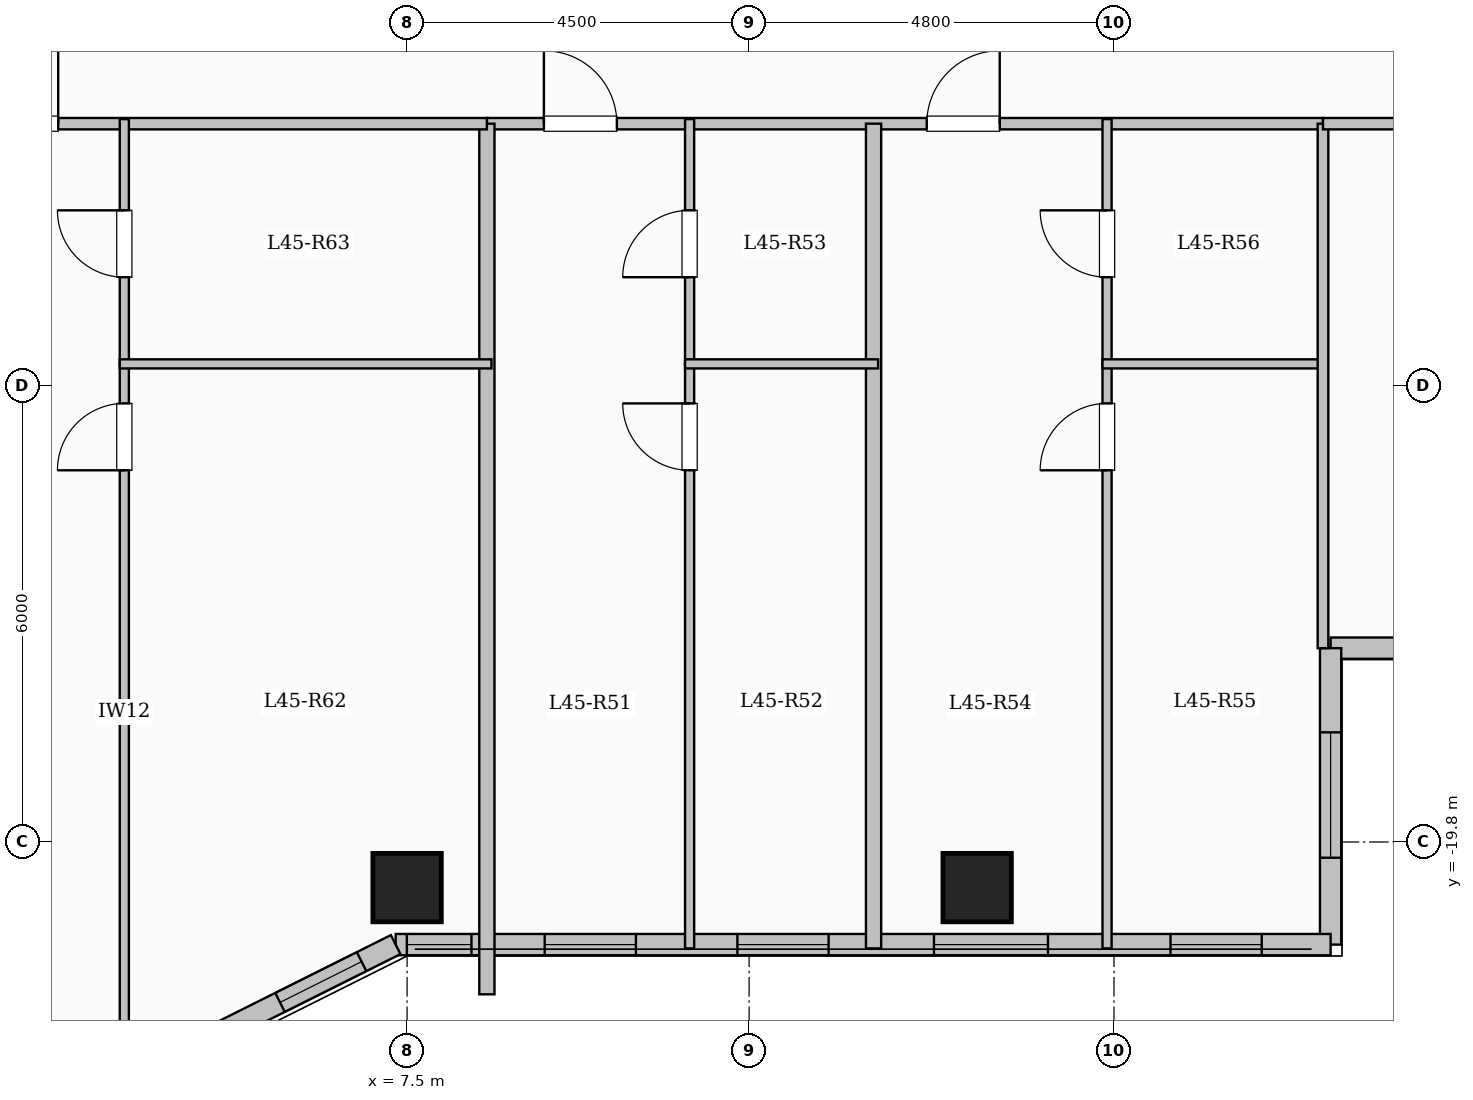
"""IFC4 building model, lengths in metres.
Left out: names, types, materials, properties, quantities, classifications, styles, units other than length and angle.
Written with IfcOpenShell. Run it as: python <this file> out.ifc"""

import sys

from ifc_helpers import new_model, si_unit, direction, frame, frame_2d, origin, origin_2d, place, context, subcontext, project, spatial, rectangle, extrude, element, fill, save


model = new_model("IFC4")
c1 = context("Model", 3, precision=1e-05, world=origin(), true_north=direction((0.0, 1.0)))
c2 = subcontext(c1, "Body", "Model", "MODEL_VIEW")
j1 = project(units=[si_unit("LENGTHUNIT", "METRE"), si_unit("PLANEANGLEUNIT", "RADIAN")], contexts=[c1])
p1 = place(None, origin())
s1 = spatial("IfcSite", under=j1, at=p1, CompositionType="ELEMENT")
p2 = place(p1, origin())
s2 = spatial("IfcBuilding", under=s1, at=p2, CompositionType="ELEMENT")
p3 = place(p2, frame((0.0, 0.0, 166.1)))
s3 = spatial("IfcBuildingStorey", under=s2, at=p3, CompositionType="ELEMENT", Elevation=166.1)
for number, where, z_axis, x_axis in (
    (1, (7.5, -20.4, 0.0), (0.0, 0.0, 1.0), (1.0, 0.0, 0.0)),
    (2, (15.0, -20.4, 0.0), (0.0, 0.0, 1.0), (1.0, 0.0, 0.0)),
):
    element("IfcColumn", number, at=place(p3, frame(where, z_axis=z_axis, x_axis=x_axis)), inside=s3, PredefinedType="COLUMN", context=c2, shape_type="SweptSolid", body=[
        extrude(rectangle(XDim=0.9, YDim=0.9, at=origin_2d()), origin(), (0.0, 0.0, 1.0), 3.35),
    ])
p4 = place(p3, frame((25.05, -17.25, 0.0), z_axis=(0.0, 0.0, 1.0), x_axis=(-1.0, 0.0, 0.0)))
e3 = element("IfcWall", 3, at=p4, inside=s3, PredefinedType="SOLIDWALL", context=c2, shape_type="SweptSolid", body=[
    extrude(rectangle(XDim=5.4, YDim=0.28, at=frame_2d((2.7, 0.0))), origin(), (0.0, 0.0, 1.0), 3.1),
])
p5 = place(p4, frame((1.625, 0.0, 0.9)))
e4 = element("IfcOpeningElement", 4, at=p5, cuts=e3, PredefinedType="OPENING", context=c2, shape_type="SweptSolid", body=[
    extrude(rectangle(XDim=2.2, YDim=1.75, at=frame_2d((1.1, 0.875))), frame((0.0, 0.15, 0.0), z_axis=(0.0, -1.0, 0.0), x_axis=(1.0, 0.0, 0.0)), (0.0, 0.0, 1.0), 0.3),
])
p6 = place(p3, frame((19.65, -17.25, 0.0), z_axis=(0.0, 0.0, 1.0), x_axis=(0.0, -1.0, 0.0)))
e5 = element("IfcWall", 5, at=p6, inside=s3, PredefinedType="SOLIDWALL", context=c2, shape_type="SweptSolid", body=[
    extrude(rectangle(XDim=3.9, YDim=0.28, at=frame_2d((1.95, 0.0))), origin(), (0.0, 0.0, 1.0), 3.1),
])
p7 = place(p6, frame((1.107, 0.0, 0.9)))
e6 = element("IfcOpeningElement", 6, at=p7, cuts=e5, PredefinedType="OPENING", context=c2, shape_type="SweptSolid", body=[
    extrude(rectangle(XDim=1.65, YDim=1.6, at=frame_2d((0.825, 0.8))), frame((0.0, 0.15, 0.0), z_axis=(0.0, -1.0, 0.0), x_axis=(1.0, 0.0, 0.0)), (0.0, 0.0, 1.0), 0.3),
])
p8 = place(p3, frame((19.65, -21.15, 0.0), z_axis=(0.0, 0.0, 1.0), x_axis=(-1.0, 0.0, 0.0)))
e7 = element("IfcWall", 7, at=p8, inside=s3, PredefinedType="SOLIDWALL", context=c2, shape_type="SweptSolid", body=[
    extrude(rectangle(XDim=12.3, YDim=0.28, at=frame_2d((6.15, 0.0))), origin(), (0.0, 0.0, 1.0), 3.1),
])
p9 = place(p8, frame((0.906, 0.0, 0.95)))
e8 = element("IfcOpeningElement", 8, at=p9, cuts=e7, PredefinedType="OPENING", context=c2, shape_type="SweptSolid", body=[
    extrude(rectangle(XDim=1.2, YDim=1.5, at=frame_2d((0.6, 0.75))), frame((0.0, 0.15, 0.0), z_axis=(0.0, -1.0, 0.0), x_axis=(1.0, 0.0, 0.0)), (0.0, 0.0, 1.0), 0.3),
])
p10 = place(p8, frame((3.718, 0.0, 0.9)))
e9 = element("IfcOpeningElement", 9, at=p10, cuts=e7, PredefinedType="OPENING", context=c2, shape_type="SweptSolid", body=[
    extrude(rectangle(XDim=1.5, YDim=1.65, at=frame_2d((0.75, 0.825))), frame((0.0, 0.15, 0.0), z_axis=(0.0, -1.0, 0.0), x_axis=(1.0, 0.0, 0.0)), (0.0, 0.0, 1.0), 0.3),
])
p11 = place(p8, frame((6.604, 0.0, 0.95)))
e10 = element("IfcOpeningElement", 10, at=p11, cuts=e7, PredefinedType="OPENING", context=c2, shape_type="SweptSolid", body=[
    extrude(rectangle(XDim=1.2, YDim=1.5, at=frame_2d((0.6, 0.75))), frame((0.0, 0.15, 0.0), z_axis=(0.0, -1.0, 0.0), x_axis=(1.0, 0.0, 0.0)), (0.0, 0.0, 1.0), 0.3),
])
p12 = place(p8, frame((9.14, 0.0, 0.95)))
e11 = element("IfcOpeningElement", 11, at=p12, cuts=e7, PredefinedType="OPENING", context=c2, shape_type="SweptSolid", body=[
    extrude(rectangle(XDim=1.2, YDim=1.5, at=frame_2d((0.6, 0.75))), frame((0.0, 0.15, 0.0), z_axis=(0.0, -1.0, 0.0), x_axis=(1.0, 0.0, 0.0)), (0.0, 0.0, 1.0), 0.3),
])
p13 = place(p8, frame((11.303, 0.0, 0.95)))
e12 = element("IfcOpeningElement", 12, at=p13, cuts=e7, PredefinedType="OPENING", context=c2, shape_type="SweptSolid", body=[
    extrude(rectangle(XDim=0.85, YDim=1.5, at=frame_2d((0.425, 0.75))), frame((0.0, 0.15, 0.0), z_axis=(0.0, -1.0, 0.0), x_axis=(1.0, 0.0, 0.0)), (0.0, 0.0, 1.0), 0.3),
])
p14 = place(p3, frame((7.35, -21.15, 0.0), z_axis=(0.0, 0.0, 1.0), x_axis=(-0.894427191, -0.4472135955, 0.0)))
e13 = element("IfcWall", 13, at=p14, inside=s3, PredefinedType="SOLIDWALL", context=c2, shape_type="SweptSolid", body=[
    extrude(rectangle(XDim=3.354, YDim=0.28, at=frame_2d((1.677, 0.0))), origin(), (0.0, 0.0, 1.0), 3.1),
])
p15 = place(p14, frame((0.501, 0.0, 0.95)))
e14 = element("IfcOpeningElement", 14, at=p15, cuts=e13, PredefinedType="OPENING", context=c2, shape_type="SweptSolid", body=[
    extrude(rectangle(XDim=1.2, YDim=1.5, at=frame_2d((0.6, 0.75))), frame((0.0, 0.15, 0.0), z_axis=(0.0, -1.0, 0.0), x_axis=(1.0, 0.0, 0.0)), (0.0, 0.0, 1.0), 0.3),
])
p16 = place(p3, frame((8.55, -10.35, 0.0), z_axis=(0.0, 0.0, 1.0), x_axis=(1.0, 0.0, 0.0)))
e15 = element("IfcWall", 15, at=p16, inside=s3, PredefinedType="PARTITIONING", context=c2, shape_type="SweptSolid", body=[
    extrude(rectangle(XDim=11.0, YDim=0.15, at=frame_2d((5.5, 0.0))), origin(), (0.0, 0.0, 1.0), 3.1),
])
p17 = place(p16, frame((0.75, 0.0, 0.0)))
e16 = element("IfcOpeningElement", 16, at=p17, cuts=e15, PredefinedType="OPENING", context=c2, shape_type="SweptSolid", body=[
    extrude(rectangle(XDim=0.96, YDim=2.15, at=frame_2d((0.48, 1.075))), frame((0.0, 0.085, 0.0), z_axis=(0.0, -1.0, 0.0), x_axis=(1.0, 0.0, 0.0)), (0.0, 0.0, 1.0), 0.17),
])
p18 = place(p16, frame((5.787, 0.0, 0.0)))
e17 = element("IfcOpeningElement", 17, at=p18, cuts=e15, PredefinedType="OPENING", context=c2, shape_type="SweptSolid", body=[
    extrude(rectangle(XDim=0.96, YDim=2.15, at=frame_2d((0.48, 1.075))), frame((0.0, 0.085, 0.0), z_axis=(0.0, -1.0, 0.0), x_axis=(1.0, 0.0, 0.0)), (0.0, 0.0, 1.0), 0.17),
])
p19 = place(p3, frame((13.637, -21.2, 0.0), z_axis=(0.0, 0.0, 1.0), x_axis=(0.0, 1.0, 0.0)))
e18 = element("IfcWall", 18, at=p19, inside=s3, PredefinedType="SOLIDWALL", context=c2, shape_type="SweptSolid", body=[
    extrude(rectangle(XDim=10.85, YDim=0.2, at=frame_2d((5.425, 0.0))), origin(), (0.0, 0.0, 1.0), 3.1),
])
p20 = place(p3, frame((11.217, -21.2, 0.0), z_axis=(0.0, 0.0, 1.0), x_axis=(0.0, 1.0, 0.0)))
e19 = element("IfcWall", 19, at=p20, inside=s3, PredefinedType="PARTITIONING", context=c2, shape_type="SweptSolid", body=[
    extrude(rectangle(XDim=7.69, YDim=0.12, at=frame_2d((3.845, 0.0))), origin(), (0.0, 0.0, 1.0), 3.1),
])
p21 = place(p20, frame((6.29, 0.0, 0.0)))
e20 = element("IfcOpeningElement", 20, at=p21, cuts=e19, PredefinedType="OPENING", context=c2, shape_type="SweptSolid", body=[
    extrude(rectangle(XDim=0.88, YDim=2.1, at=frame_2d((0.44, 1.05))), frame((0.0, 0.07, 0.0), z_axis=(0.0, -1.0, 0.0), x_axis=(1.0, 0.0, 0.0)), (0.0, 0.0, 1.0), 0.14),
])
p22 = place(p3, frame((11.217, -13.51, 0.0), z_axis=(0.0, 0.0, 1.0), x_axis=(0.0, 1.0, 0.0)))
e21 = element("IfcWall", 21, at=p22, inside=s3, PredefinedType="PARTITIONING", context=c2, shape_type="SweptSolid", body=[
    extrude(rectangle(XDim=3.22, YDim=0.12, at=frame_2d((1.61, 0.0))), origin(), (0.0, 0.0, 1.0), 3.1),
])
p23 = place(p22, frame((1.14, 0.0, 0.0)))
e22 = element("IfcOpeningElement", 22, at=p23, cuts=e21, PredefinedType="OPENING", context=c2, shape_type="SweptSolid", body=[
    extrude(rectangle(XDim=0.88, YDim=2.1, at=frame_2d((0.44, 1.05))), frame((0.0, 0.07, 0.0), z_axis=(0.0, -1.0, 0.0), x_axis=(1.0, 0.0, 0.0)), (0.0, 0.0, 1.0), 0.14),
])
p24 = place(p3, frame((11.157, -13.51, 0.0), z_axis=(0.0, 0.0, 1.0), x_axis=(1.0, 0.0, 0.0)))
e23 = element("IfcWall", 23, at=p24, inside=s3, PredefinedType="PARTITIONING", context=c2, shape_type="SweptSolid", body=[
    extrude(rectangle(XDim=2.54, YDim=0.12, at=frame_2d((1.27, 0.0))), origin(), (0.0, 0.0, 1.0), 3.1),
])
p25 = place(p3, frame((16.709, -21.2, 0.0), z_axis=(0.0, 0.0, 1.0), x_axis=(0.0, 1.0, 0.0)))
e24 = element("IfcWall", 24, at=p25, inside=s3, PredefinedType="PARTITIONING", context=c2, shape_type="SweptSolid", body=[
    extrude(rectangle(XDim=7.69, YDim=0.12, at=frame_2d((3.845, 0.0))), origin(), (0.0, 0.0, 1.0), 3.1),
])
p26 = place(p25, frame((6.29, 0.0, 0.0)))
e25 = element("IfcOpeningElement", 25, at=p26, cuts=e24, PredefinedType="OPENING", context=c2, shape_type="SweptSolid", body=[
    extrude(rectangle(XDim=0.88, YDim=2.1, at=frame_2d((0.44, 1.05))), frame((0.0, 0.07, 0.0), z_axis=(0.0, -1.0, 0.0), x_axis=(1.0, 0.0, 0.0)), (0.0, 0.0, 1.0), 0.14),
])
p27 = place(p3, frame((16.709, -13.51, 0.0), z_axis=(0.0, 0.0, 1.0), x_axis=(0.0, 1.0, 0.0)))
e26 = element("IfcWall", 26, at=p27, inside=s3, PredefinedType="PARTITIONING", context=c2, shape_type="SweptSolid", body=[
    extrude(rectangle(XDim=3.22, YDim=0.12, at=frame_2d((1.61, 0.0))), origin(), (0.0, 0.0, 1.0), 3.1),
])
p28 = place(p27, frame((1.14, 0.0, 0.0)))
e27 = element("IfcOpeningElement", 27, at=p28, cuts=e26, PredefinedType="OPENING", context=c2, shape_type="SweptSolid", body=[
    extrude(rectangle(XDim=0.88, YDim=2.1, at=frame_2d((0.44, 1.05))), frame((0.0, 0.07, 0.0), z_axis=(0.0, -1.0, 0.0), x_axis=(1.0, 0.0, 0.0)), (0.0, 0.0, 1.0), 0.14),
])
p29 = place(p3, frame((16.649, -13.51, 0.0), z_axis=(0.0, 0.0, 1.0), x_axis=(1.0, 0.0, 0.0)))
e28 = element("IfcWall", 28, at=p29, inside=s3, PredefinedType="PARTITIONING", context=c2, shape_type="SweptSolid", body=[
    extrude(rectangle(XDim=2.961, YDim=0.12, at=frame_2d((1.48, 0.0))), origin(), (0.0, 0.0, 1.0), 3.1),
])
p30 = place(p3, frame((8.55, -21.804, 0.0), z_axis=(0.0, 0.0, 1.0), x_axis=(0.0, 1.0, 0.0)))
e29 = element("IfcWall", 29, at=p30, inside=s3, PredefinedType="SOLIDWALL", context=c2, shape_type="SweptSolid", body=[
    extrude(rectangle(XDim=11.454, YDim=0.2, at=frame_2d((5.727, 0.0))), origin(), (0.0, 0.0, 1.0), 3.1),
])
p31 = place(p3, frame((-8.55, -10.35, 0.0), z_axis=(0.0, 0.0, 1.0), x_axis=(1.0, 0.0, 0.0)))
e30 = element("IfcWall", 30, at=p31, inside=s3, PredefinedType="PARTITIONING", context=c2, shape_type="SweptSolid", body=[
    extrude(rectangle(XDim=17.1, YDim=0.15, at=frame_2d((8.55, 0.0))), origin(), (0.0, 0.0, 1.0), 3.1),
])
p32 = place(p31, frame((1.15, 0.0, 0.0)))
e31 = element("IfcOpeningElement", 31, at=p32, cuts=e30, PredefinedType="OPENING", context=c2, shape_type="SweptSolid", body=[
    extrude(rectangle(XDim=0.96, YDim=2.15, at=frame_2d((0.48, 1.075))), frame((0.0, 0.085, 0.0), z_axis=(0.0, -1.0, 0.0), x_axis=(1.0, 0.0, 0.0)), (0.0, 0.0, 1.0), 0.17),
])
p33 = place(p31, frame((10.5, 0.0, 0.0)))
e32 = element("IfcOpeningElement", 32, at=p33, cuts=e30, PredefinedType="OPENING", context=c2, shape_type="SweptSolid", body=[
    extrude(rectangle(XDim=0.96, YDim=2.15, at=frame_2d((0.48, 1.075))), frame((0.0, 0.085, 0.0), z_axis=(0.0, -1.0, 0.0), x_axis=(1.0, 0.0, 0.0)), (0.0, 0.0, 1.0), 0.17),
])
p34 = place(p3, frame((3.78, -22.68, 0.0), z_axis=(0.0, 0.0, 1.0), x_axis=(0.0, 1.0, 0.0)))
e33 = element("IfcWall", 33, at=p34, inside=s3, PredefinedType="PARTITIONING", context=c2, shape_type="SweptSolid", body=[
    extrude(rectangle(XDim=9.17, YDim=0.12, at=frame_2d((4.585, 0.0))), origin(), (0.0, 0.0, 1.0), 3.1),
])
p35 = place(p34, frame((7.77, 0.0, 0.0)))
e34 = element("IfcOpeningElement", 34, at=p35, cuts=e33, PredefinedType="OPENING", context=c2, shape_type="SweptSolid", body=[
    extrude(rectangle(XDim=0.88, YDim=2.1, at=frame_2d((0.44, 1.05))), frame((0.0, 0.07, 0.0), z_axis=(0.0, -1.0, 0.0), x_axis=(1.0, 0.0, 0.0)), (0.0, 0.0, 1.0), 0.14),
])
p36 = place(p3, frame((3.78, -13.51, 0.0), z_axis=(0.0, 0.0, 1.0), x_axis=(0.0, 1.0, 0.0)))
e35 = element("IfcWall", 35, at=p36, inside=s3, PredefinedType="PARTITIONING", context=c2, shape_type="SweptSolid", body=[
    extrude(rectangle(XDim=3.22, YDim=0.12, at=frame_2d((1.61, 0.0))), origin(), (0.0, 0.0, 1.0), 3.1),
])
p37 = place(p36, frame((1.14, 0.0, 0.0)))
e36 = element("IfcOpeningElement", 36, at=p37, cuts=e35, PredefinedType="OPENING", context=c2, shape_type="SweptSolid", body=[
    extrude(rectangle(XDim=0.88, YDim=2.1, at=frame_2d((0.44, 1.05))), frame((0.0, 0.07, 0.0), z_axis=(0.0, -1.0, 0.0), x_axis=(1.0, 0.0, 0.0)), (0.0, 0.0, 1.0), 0.14),
])
p38 = place(p3, frame((3.72, -13.51, 0.0), z_axis=(0.0, 0.0, 1.0), x_axis=(1.0, 0.0, 0.0)))
e37 = element("IfcWall", 37, at=p38, inside=s3, PredefinedType="PARTITIONING", context=c2, shape_type="SweptSolid", body=[
    extrude(rectangle(XDim=4.89, YDim=0.12, at=frame_2d((2.445, 0.0))), origin(), (0.0, 0.0, 1.0), 3.1),
])
p39 = place(p3, frame((19.55, -17.25, 0.0), z_axis=(0.0, 0.0, 1.0), x_axis=(0.0, 1.0, 0.0)))
e38 = element("IfcWall", 38, at=p39, inside=s3, PredefinedType="PARTITIONING", context=c2, shape_type="SweptSolid", body=[
    extrude(rectangle(XDim=6.9, YDim=0.14, at=frame_2d((3.45, 0.0))), origin(), (0.0, 0.0, 1.0), 3.1),
])
p40 = place(p3, frame((19.55, -10.35, 0.0), z_axis=(0.0, 0.0, 1.0), x_axis=(1.0, 0.0, 0.0)))
e39 = element("IfcWall", 39, at=p40, inside=s3, PredefinedType="PARTITIONING", context=c2, shape_type="SweptSolid", body=[
    extrude(rectangle(XDim=5.53, YDim=0.15, at=frame_2d((2.765, 0.0))), origin(), (0.0, 0.0, 1.0), 3.1),
])
p41 = place(p40, frame((2.29, 0.0, 0.0)))
e40 = element("IfcOpeningElement", 40, at=p41, cuts=e39, PredefinedType="OPENING", context=c2, shape_type="SweptSolid", body=[
    extrude(rectangle(XDim=0.95, YDim=2.15, at=frame_2d((0.475, 1.075))), frame((0.0, 0.085, 0.0), z_axis=(0.0, -1.0, 0.0), x_axis=(1.0, 0.0, 0.0)), (0.0, 0.0, 1.0), 0.17),
])
p42 = place(p7, origin())
e41 = element("IfcWindow", 41, at=p42, inside=s3, PartitioningType="SINGLE_PANEL", PredefinedType="WINDOW", context=c2, shape_type="SweptSolid", body=[
    extrude(rectangle(XDim=1.65, YDim=1.6, at=frame_2d((0.825, 0.8))), frame((0.0, 0.03, 0.0), z_axis=(0.0, -1.0, 0.0), x_axis=(1.0, 0.0, 0.0)), (0.0, 0.0, 1.0), 0.06),
])
fill(e6, e41)
p43 = place(p9, origin())
e42 = element("IfcWindow", 42, at=p43, inside=s3, PartitioningType="SINGLE_PANEL", PredefinedType="WINDOW", context=c2, shape_type="SweptSolid", body=[
    extrude(rectangle(XDim=1.2, YDim=1.5, at=frame_2d((0.6, 0.75))), frame((0.0, 0.03, 0.0), z_axis=(0.0, -1.0, 0.0), x_axis=(1.0, 0.0, 0.0)), (0.0, 0.0, 1.0), 0.06),
])
fill(e8, e42)
p44 = place(p10, origin())
e43 = element("IfcWindow", 43, at=p44, inside=s3, PartitioningType="SINGLE_PANEL", PredefinedType="WINDOW", context=c2, shape_type="SweptSolid", body=[
    extrude(rectangle(XDim=1.5, YDim=1.65, at=frame_2d((0.75, 0.825))), frame((0.0, 0.03, 0.0), z_axis=(0.0, -1.0, 0.0), x_axis=(1.0, 0.0, 0.0)), (0.0, 0.0, 1.0), 0.06),
])
fill(e9, e43)
p45 = place(p11, origin())
e44 = element("IfcWindow", 44, at=p45, inside=s3, PartitioningType="SINGLE_PANEL", PredefinedType="WINDOW", context=c2, shape_type="SweptSolid", body=[
    extrude(rectangle(XDim=1.2, YDim=1.5, at=frame_2d((0.6, 0.75))), frame((0.0, 0.03, 0.0), z_axis=(0.0, -1.0, 0.0), x_axis=(1.0, 0.0, 0.0)), (0.0, 0.0, 1.0), 0.06),
])
fill(e10, e44)
p46 = place(p12, origin())
e45 = element("IfcWindow", 45, at=p46, inside=s3, PartitioningType="SINGLE_PANEL", PredefinedType="WINDOW", context=c2, shape_type="SweptSolid", body=[
    extrude(rectangle(XDim=1.2, YDim=1.5, at=frame_2d((0.6, 0.75))), frame((0.0, 0.03, 0.0), z_axis=(0.0, -1.0, 0.0), x_axis=(1.0, 0.0, 0.0)), (0.0, 0.0, 1.0), 0.06),
])
fill(e11, e45)
p47 = place(p13, origin())
e46 = element("IfcWindow", 46, at=p47, inside=s3, PartitioningType="SINGLE_PANEL", PredefinedType="WINDOW", context=c2, shape_type="SweptSolid", body=[
    extrude(rectangle(XDim=0.85, YDim=1.5, at=frame_2d((0.425, 0.75))), frame((0.0, 0.03, 0.0), z_axis=(0.0, -1.0, 0.0), x_axis=(1.0, 0.0, 0.0)), (0.0, 0.0, 1.0), 0.06),
])
fill(e12, e46)
p48 = place(p15, origin())
e47 = element("IfcWindow", 47, at=p48, inside=s3, PartitioningType="SINGLE_PANEL", PredefinedType="WINDOW", context=c2, shape_type="SweptSolid", body=[
    extrude(rectangle(XDim=1.2, YDim=1.5, at=frame_2d((0.6, 0.75))), frame((0.0, 0.03, 0.0), z_axis=(0.0, -1.0, 0.0), x_axis=(1.0, 0.0, 0.0)), (0.0, 0.0, 1.0), 0.06),
])
fill(e14, e47)
p49 = place(p17, origin())
e48 = element("IfcDoor", 48, at=p49, inside=s3, OperationType="SINGLE_SWING_LEFT", PredefinedType="DOOR", context=c2, shape_type="SweptSolid", body=[
    extrude(rectangle(XDim=0.96, YDim=2.15, at=frame_2d((0.48, 1.075))), frame((0.0, 0.025, 0.0), z_axis=(0.0, -1.0, 0.0), x_axis=(1.0, 0.0, 0.0)), (0.0, 0.0, 1.0), 0.05),
])
fill(e16, e48)
p50 = place(p21, origin())
e49 = element("IfcDoor", 49, at=p50, inside=s3, OperationType="SINGLE_SWING_RIGHT", PredefinedType="DOOR", context=c2, shape_type="SweptSolid", body=[
    extrude(rectangle(XDim=0.88, YDim=2.1, at=frame_2d((0.44, 1.05))), frame((0.0, 0.025, 0.0), z_axis=(0.0, -1.0, 0.0), x_axis=(1.0, 0.0, 0.0)), (0.0, 0.0, 1.0), 0.05),
])
fill(e20, e49)
p51 = place(p23, origin())
e50 = element("IfcDoor", 50, at=p51, inside=s3, OperationType="SINGLE_SWING_LEFT", PredefinedType="DOOR", context=c2, shape_type="SweptSolid", body=[
    extrude(rectangle(XDim=0.88, YDim=2.1, at=frame_2d((0.44, 1.05))), frame((0.0, 0.025, 0.0), z_axis=(0.0, -1.0, 0.0), x_axis=(1.0, 0.0, 0.0)), (0.0, 0.0, 1.0), 0.05),
])
fill(e22, e50)
p52 = place(p18, origin())
e51 = element("IfcDoor", 51, at=p52, inside=s3, OperationType="SINGLE_SWING_RIGHT", PredefinedType="DOOR", context=c2, shape_type="SweptSolid", body=[
    extrude(rectangle(XDim=0.96, YDim=2.15, at=frame_2d((0.48, 1.075))), frame((0.0, 0.025, 0.0), z_axis=(0.0, -1.0, 0.0), x_axis=(1.0, 0.0, 0.0)), (0.0, 0.0, 1.0), 0.05),
])
fill(e17, e51)
p53 = place(p26, origin())
e52 = element("IfcDoor", 52, at=p53, inside=s3, OperationType="SINGLE_SWING_LEFT", PredefinedType="DOOR", context=c2, shape_type="SweptSolid", body=[
    extrude(rectangle(XDim=0.88, YDim=2.1, at=frame_2d((0.44, 1.05))), frame((0.0, 0.025, 0.0), z_axis=(0.0, -1.0, 0.0), x_axis=(1.0, 0.0, 0.0)), (0.0, 0.0, 1.0), 0.05),
])
fill(e25, e52)
p54 = place(p28, origin())
e53 = element("IfcDoor", 53, at=p54, inside=s3, OperationType="SINGLE_SWING_RIGHT", PredefinedType="DOOR", context=c2, shape_type="SweptSolid", body=[
    extrude(rectangle(XDim=0.88, YDim=2.1, at=frame_2d((0.44, 1.05))), frame((0.0, 0.025, 0.0), z_axis=(0.0, -1.0, 0.0), x_axis=(1.0, 0.0, 0.0)), (0.0, 0.0, 1.0), 0.05),
])
fill(e27, e53)
p55 = place(p33, origin())
e54 = element("IfcDoor", 54, at=p55, inside=s3, OperationType="SINGLE_SWING_RIGHT", PredefinedType="DOOR", context=c2, shape_type="SweptSolid", body=[
    extrude(rectangle(XDim=0.96, YDim=2.15, at=frame_2d((0.48, 1.075))), frame((0.0, 0.025, 0.0), z_axis=(0.0, -1.0, 0.0), x_axis=(1.0, 0.0, 0.0)), (0.0, 0.0, 1.0), 0.05),
])
fill(e32, e54)
p56 = place(p35, origin())
e55 = element("IfcDoor", 55, at=p56, inside=s3, OperationType="SINGLE_SWING_LEFT", PredefinedType="DOOR", context=c2, shape_type="SweptSolid", body=[
    extrude(rectangle(XDim=0.88, YDim=2.1, at=frame_2d((0.44, 1.05))), frame((0.0, 0.025, 0.0), z_axis=(0.0, -1.0, 0.0), x_axis=(1.0, 0.0, 0.0)), (0.0, 0.0, 1.0), 0.05),
])
fill(e34, e55)
p57 = place(p37, origin())
e56 = element("IfcDoor", 56, at=p57, inside=s3, OperationType="SINGLE_SWING_RIGHT", PredefinedType="DOOR", context=c2, shape_type="SweptSolid", body=[
    extrude(rectangle(XDim=0.88, YDim=2.1, at=frame_2d((0.44, 1.05))), frame((0.0, 0.025, 0.0), z_axis=(0.0, -1.0, 0.0), x_axis=(1.0, 0.0, 0.0)), (0.0, 0.0, 1.0), 0.05),
])
fill(e36, e56)
save(model, sys.argv[1])
